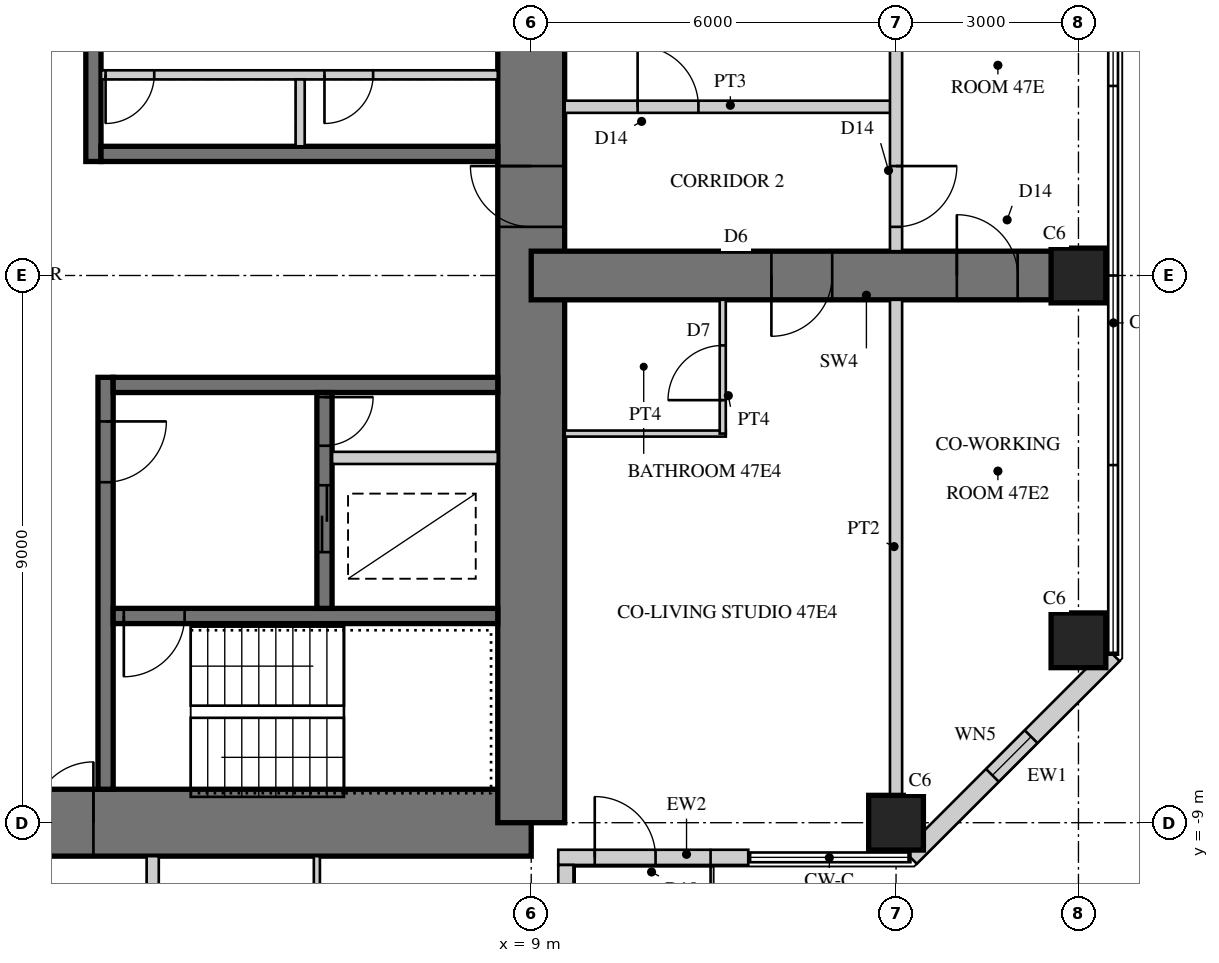
"""IFC4 building model, lengths in metres.
Left out: names, types, materials, properties, quantities, classifications, styles, units other than length and angle.
Written with IfcOpenShell. Run it as: python <this file> out.ifc"""

import sys

from ifc_helpers import new_model, si_unit, direction, frame, frame_2d, origin, origin_2d, place, context, subcontext, project, spatial, rectangle, hollow_rectangle, extrude, element, fill, save


model = new_model("IFC4")
c1 = context("Model", 3, precision=1e-05, world=origin(), true_north=direction((0.0, 1.0)))
c2 = subcontext(c1, "Body", "Model", "MODEL_VIEW")
j1 = project(units=[si_unit("LENGTHUNIT", "METRE"), si_unit("PLANEANGLEUNIT", "RADIAN")], contexts=[c1])
p1 = place(None, origin())
s1 = spatial("IfcSite", under=j1, at=p1, CompositionType="ELEMENT")
p2 = place(p1, origin())
s2 = spatial("IfcBuilding", under=s1, at=p2, CompositionType="ELEMENT")
p3 = place(p2, frame((0.0, 0.0, 189.9)))
s3 = spatial("IfcBuildingStorey", under=s2, at=p3, CompositionType="ELEMENT", Elevation=189.9)
p4 = place(p3, frame((-9.0, -9.0, 0.0), z_axis=(0.0, 0.0, 1.0), x_axis=(1.0, 0.0, 0.0)))
e1 = element("IfcWall", 1, at=p4, inside=s3, PredefinedType="SHEAR", context=c2, shape_type="SweptSolid", body=[
    extrude(rectangle(XDim=18.0, YDim=1.1, at=frame_2d((9.0, 0.0))), origin(), (0.0, 0.0, 1.0), 3.4),
])
p5 = place(p4, frame((9.8, 0.0, 0.0)))
e2 = element("IfcOpeningElement", 2, at=p5, cuts=e1, PredefinedType="OPENING", context=c2, shape_type="SweptSolid", body=[
    extrude(rectangle(XDim=1.0, YDim=2.4, at=frame_2d((0.5, 1.2))), frame((0.0, 0.56, 0.0), z_axis=(0.0, -1.0, 0.0), x_axis=(1.0, 0.0, 0.0)), (0.0, 0.0, 1.0), 1.12),
])
p6 = place(p3, frame((9.0, -9.0, 0.0), z_axis=(0.0, 0.0, 1.0), x_axis=(0.0, 1.0, 0.0)))
e3 = element("IfcWall", 3, at=p6, inside=s3, PredefinedType="SHEAR", context=c2, shape_type="SweptSolid", body=[
    extrude(rectangle(XDim=18.0, YDim=1.1, at=frame_2d((9.0, 0.0))), origin(), (0.0, 0.0, 1.0), 3.4),
])
p7 = place(p6, frame((9.8, 0.0, 0.0)))
e4 = element("IfcOpeningElement", 4, at=p7, cuts=e3, PredefinedType="OPENING", context=c2, shape_type="SweptSolid", body=[
    extrude(rectangle(XDim=1.0, YDim=2.4, at=frame_2d((0.5, 1.2))), frame((0.0, 0.56, 0.0), z_axis=(0.0, -1.0, 0.0), x_axis=(1.0, 0.0, 0.0)), (0.0, 0.0, 1.0), 1.12),
])
p8 = place(p3, frame((1.8, 1.875, 0.0), z_axis=(0.0, 0.0, 1.0), x_axis=(0.0, 1.0, 0.0)))
e5 = element("IfcWall", 5, at=p8, inside=s3, PredefinedType="SHEAR", context=c2, shape_type="SweptSolid", body=[
    extrude(rectangle(XDim=6.575, YDim=0.25, at=frame_2d((3.288, 0.0))), origin(), (0.0, 0.0, 1.0), 3.4),
])
p9 = place(p8, frame((1.875, 0.0, 0.0)))
e6 = element("IfcOpeningElement", 6, at=p9, cuts=e5, PredefinedType="OPENING", context=c2, shape_type="SweptSolid", body=[
    extrude(rectangle(XDim=1.6, YDim=2.4, at=frame_2d((0.8, 1.2))), frame((0.0, 0.135, 0.0), z_axis=(0.0, -1.0, 0.0), x_axis=(1.0, 0.0, 0.0)), (0.0, 0.0, 1.0), 0.27),
])
p10 = place(p3, frame((1.925, 2.0, 0.0), z_axis=(0.0, 0.0, 1.0), x_axis=(1.0, 0.0, 0.0)))
e7 = element("IfcWall", 7, at=p10, inside=s3, PredefinedType="SHEAR", context=c2, shape_type="SweptSolid", body=[
    extrude(rectangle(XDim=6.525, YDim=0.25, at=frame_2d((3.262, 0.0))), origin(), (0.0, 0.0, 1.0), 3.4),
])
p11 = place(p3, frame((1.925, 3.3, 0.0), z_axis=(0.0, 0.0, 1.0), x_axis=(1.0, 0.0, 0.0)))
e8 = element("IfcWall", 8, at=p11, inside=s3, PredefinedType="PARTITIONING", context=c2, shape_type="SweptSolid", body=[
    extrude(rectangle(XDim=6.525, YDim=0.15, at=frame_2d((3.262, 0.0))), origin(), (0.0, 0.0, 1.0), 3.4),
])
p12 = place(p11, frame((0.075, 0.0, 0.0)))
e9 = element("IfcOpeningElement", 9, at=p12, cuts=e8, PredefinedType="OPENING", context=c2, shape_type="SweptSolid", body=[
    extrude(rectangle(XDim=0.8, YDim=2.1, at=frame_2d((0.4, 1.05))), frame((0.0, 0.085, 0.0), z_axis=(0.0, -1.0, 0.0), x_axis=(1.0, 0.0, 0.0)), (0.0, 0.0, 1.0), 0.17),
])
p13 = place(p11, frame((3.675, 0.0, 0.0)))
e10 = element("IfcOpeningElement", 10, at=p13, cuts=e8, PredefinedType="OPENING", context=c2, shape_type="SweptSolid", body=[
    extrude(rectangle(XDim=0.8, YDim=2.1, at=frame_2d((0.4, 1.05))), frame((0.0, 0.085, 0.0), z_axis=(0.0, -1.0, 0.0), x_axis=(1.0, 0.0, 0.0)), (0.0, 0.0, 1.0), 0.17),
])
p14 = place(p3, frame((5.2, 2.125, 0.0), z_axis=(0.0, 0.0, 1.0), x_axis=(0.0, 1.0, 0.0)))
e11 = element("IfcWall", 11, at=p14, inside=s3, PredefinedType="PARTITIONING", context=c2, shape_type="SweptSolid", body=[
    extrude(rectangle(XDim=1.1, YDim=0.15, at=frame_2d((0.55, 0.0))), origin(), (0.0, 0.0, 1.0), 3.4),
])
p15 = place(p3, frame((2.0, -1.675, 0.0), z_axis=(0.0, 0.0, 1.0), x_axis=(0.0, -1.0, 0.0)))
e12 = element("IfcWall", 12, at=p15, inside=s3, PredefinedType="SHEAR", context=c2, shape_type="SweptSolid", body=[
    extrude(rectangle(XDim=6.775, YDim=0.25, at=frame_2d((3.387, 0.0))), origin(), (0.0, 0.0, 1.0), 3.4),
])
p16 = place(p15, frame((0.725, 0.0, 0.0)))
e13 = element("IfcOpeningElement", 13, at=p16, cuts=e12, PredefinedType="OPENING", context=c2, shape_type="SweptSolid", body=[
    extrude(rectangle(XDim=1.0, YDim=2.1, at=frame_2d((0.5, 1.05))), frame((0.0, 0.135, 0.0), z_axis=(0.0, -1.0, 0.0), x_axis=(1.0, 0.0, 0.0)), (0.0, 0.0, 1.0), 0.27),
])
p17 = place(p3, frame((2.125, -1.8, 0.0), z_axis=(0.0, 0.0, 1.0), x_axis=(1.0, 0.0, 0.0)))
e14 = element("IfcWall", 14, at=p17, inside=s3, PredefinedType="SHEAR", context=c2, shape_type="SweptSolid", body=[
    extrude(rectangle(XDim=6.325, YDim=0.25, at=frame_2d((3.163, 0.0))), origin(), (0.0, 0.0, 1.0), 3.4),
])
p18 = place(p3, frame((2.125, -5.6, 0.0), z_axis=(0.0, 0.0, 1.0), x_axis=(1.0, 0.0, 0.0)))
e15 = element("IfcWall", 15, at=p18, inside=s3, PredefinedType="SHEAR", context=c2, shape_type="SweptSolid", body=[
    extrude(rectangle(XDim=6.325, YDim=0.25, at=frame_2d((3.163, 0.0))), origin(), (0.0, 0.0, 1.0), 3.4),
])
p19 = place(p18, frame((0.175, 0.0, 0.0)))
e16 = element("IfcOpeningElement", 16, at=p19, cuts=e15, PredefinedType="OPENING", context=c2, shape_type="SweptSolid", body=[
    extrude(rectangle(XDim=1.0, YDim=2.1, at=frame_2d((0.5, 1.05))), frame((0.0, 0.135, 0.0), z_axis=(0.0, -1.0, 0.0), x_axis=(1.0, 0.0, 0.0)), (0.0, 0.0, 1.0), 0.27),
])
p20 = place(p3, frame((5.6, -1.925, 0.0), z_axis=(0.0, 0.0, 1.0), x_axis=(0.0, -1.0, 0.0)))
e17 = element("IfcWall", 17, at=p20, inside=s3, PredefinedType="SHEAR", context=c2, shape_type="SweptSolid", body=[
    extrude(rectangle(XDim=3.55, YDim=0.25, at=frame_2d((1.775, 0.0))), origin(), (0.0, 0.0, 1.0), 3.4),
])
p21 = place(p20, frame((1.525, 0.0, 0.0)))
e18 = element("IfcOpeningElement", 18, at=p21, cuts=e17, PredefinedType="OPENING", context=c2, shape_type="SweptSolid", body=[
    extrude(rectangle(XDim=1.1, YDim=2.2, at=frame_2d((0.55, 1.1))), frame((0.0, 0.135, 0.0), z_axis=(0.0, -1.0, 0.0), x_axis=(1.0, 0.0, 0.0)), (0.0, 0.0, 1.0), 0.27),
])
p22 = place(p20, frame((0.075, 0.0, 0.0)))
e19 = element("IfcOpeningElement", 19, at=p22, cuts=e17, PredefinedType="OPENING", context=c2, shape_type="SweptSolid", body=[
    extrude(rectangle(XDim=0.8, YDim=2.1, at=frame_2d((0.4, 1.05))), frame((0.0, 0.135, 0.0), z_axis=(0.0, -1.0, 0.0), x_axis=(1.0, 0.0, 0.0)), (0.0, 0.0, 1.0), 0.27),
])
p23 = place(p3, frame((5.725, -3.0, 0.0), z_axis=(0.0, 0.0, 1.0), x_axis=(1.0, 0.0, 0.0)))
e20 = element("IfcWall", 20, at=p23, inside=s3, PredefinedType="PARTITIONING", context=c2, shape_type="SweptSolid", body=[
    extrude(rectangle(XDim=2.725, YDim=0.2, at=frame_2d((1.362, 0.0))), origin(), (0.0, 0.0, 1.0), 3.4),
])
p24 = place(p3, frame((9.0, 0.0, 0.0), z_axis=(0.0, 0.0, 1.0), x_axis=(1.0, 0.0, 0.0)))
e21 = element("IfcWall", 21, at=p24, inside=s3, PredefinedType="SHEAR", context=c2, shape_type="SweptSolid", body=[
    extrude(rectangle(XDim=9.0, YDim=0.8, at=frame_2d((4.5, 0.0))), origin(), (0.0, 0.0, 1.0), 3.4),
])
p25 = place(p24, frame((3.95, 0.0, 0.0)))
e22 = element("IfcOpeningElement", 22, at=p25, cuts=e21, PredefinedType="OPENING", context=c2, shape_type="SweptSolid", body=[
    extrude(rectangle(XDim=1.0, YDim=2.15, at=frame_2d((0.5, 1.075))), frame((0.0, 0.41, 0.0), z_axis=(0.0, -1.0, 0.0), x_axis=(1.0, 0.0, 0.0)), (0.0, 0.0, 1.0), 0.82),
])
p26 = place(p24, frame((7.0, 0.0, 0.0)))
e23 = element("IfcOpeningElement", 23, at=p26, cuts=e21, PredefinedType="OPENING", context=c2, shape_type="SweptSolid", body=[
    extrude(rectangle(XDim=1.0, YDim=2.2, at=frame_2d((0.5, 1.1))), frame((0.0, 0.41, 0.0), z_axis=(0.0, -1.0, 0.0), x_axis=(1.0, 0.0, 0.0)), (0.0, 0.0, 1.0), 0.82),
])
for number, where, z_axis, x_axis in (
    (24, (15.0, -9.0, 0.0), (0.0, 0.0, 1.0), (1.0, 0.0, 0.0)),
    (25, (18.0, -6.0, 0.0), (0.0, 0.0, 1.0), (1.0, 0.0, 0.0)),
    (26, (18.0, 0.0, 0.0), (0.0, 0.0, 1.0), (1.0, 0.0, 0.0)),
):
    element("IfcColumn", number, at=place(p3, frame(where, z_axis=z_axis, x_axis=x_axis)), inside=s3, PredefinedType="COLUMN", context=c2, shape_type="SweptSolid", body=[
        extrude(rectangle(XDim=0.9, YDim=0.9, at=origin_2d()), origin(), (0.0, 0.0, 1.0), 3.4),
    ])
p27 = place(p3, frame((9.445, -9.57, 0.0), z_axis=(0.0, 0.0, 1.0), x_axis=(1.0, 0.0, 0.0)))
e27 = element("IfcWall", 27, at=p27, inside=s3, PredefinedType="SOLIDWALL", context=c2, shape_type="SweptSolid", body=[
    extrude(rectangle(XDim=3.125, YDim=0.25, at=frame_2d((1.562, 0.0))), origin(), (0.0, 0.0, 1.0), 3.22),
])
p28 = place(p27, frame((0.6, 0.0, 0.0)))
e28 = element("IfcOpeningElement", 28, at=p28, cuts=e27, PredefinedType="OPENING", context=c2, shape_type="SweptSolid", body=[
    extrude(rectangle(XDim=1.0, YDim=2.2, at=frame_2d((0.5, 1.1))), frame((0.0, 0.135, 0.0), z_axis=(0.0, -1.0, 0.0), x_axis=(1.0, 0.0, 0.0)), (0.0, 0.0, 1.0), 0.27),
])
p29 = place(p3, frame((15.236, -9.57, 0.0), z_axis=(0.0, 0.0, 1.0), x_axis=(0.707106781187, 0.707106781187, 0.0)))
e29 = element("IfcWall", 29, at=p29, inside=s3, PredefinedType="SOLIDWALL", context=c2, shape_type="SweptSolid", body=[
    extrude(rectangle(XDim=4.715, YDim=0.3, at=frame_2d((2.357, 0.0))), origin(), (0.0, 0.0, 1.0), 3.22),
])
p30 = place(p29, frame((1.907, 0.0, 0.3)))
e30 = element("IfcOpeningElement", 30, at=p30, cuts=e29, PredefinedType="OPENING", context=c2, shape_type="SweptSolid", body=[
    extrude(rectangle(XDim=0.9, YDim=2.4, at=frame_2d((0.45, 1.2))), frame((0.0, 0.16, 0.0), z_axis=(0.0, -1.0, 0.0), x_axis=(1.0, 0.0, 0.0)), (0.0, 0.0, 1.0), 0.32),
])
p31 = place(p3, frame((9.57, -12.57, 0.0), z_axis=(0.0, 0.0, 1.0), x_axis=(0.0, 1.0, 0.0)))
e31 = element("IfcWall", 31, at=p31, inside=s3, PredefinedType="SOLIDWALL", context=c2, shape_type="SweptSolid", body=[
    extrude(rectangle(XDim=2.875, YDim=0.25, at=frame_2d((1.438, 0.0))), origin(), (0.0, 0.0, 1.0), 3.22),
])
p32 = place(p31, frame((0.6, 0.0, 0.0)))
e32 = element("IfcOpeningElement", 32, at=p32, cuts=e31, PredefinedType="OPENING", context=c2, shape_type="SweptSolid", body=[
    extrude(rectangle(XDim=1.0, YDim=2.2, at=frame_2d((0.5, 1.1))), frame((0.0, 0.135, 0.0), z_axis=(0.0, -1.0, 0.0), x_axis=(1.0, 0.0, 0.0)), (0.0, 0.0, 1.0), 0.27),
])
p33 = place(p3, frame((9.55, -2.6, 0.0), z_axis=(0.0, 0.0, 1.0), x_axis=(1.0, 0.0, 0.0)))
e33 = element("IfcWall", 33, at=p33, inside=s3, PredefinedType="PARTITIONING", context=c2, shape_type="SweptSolid", body=[
    extrude(rectangle(XDim=2.65, YDim=0.1, at=frame_2d((1.325, 0.0))), origin(), (0.0, 0.0, 1.0), 3.22),
])
p34 = place(p3, frame((12.15, -2.6, 0.0), z_axis=(0.0, 0.0, 1.0), x_axis=(0.0, 1.0, 0.0)))
e34 = element("IfcWall", 34, at=p34, inside=s3, PredefinedType="PARTITIONING", context=c2, shape_type="SweptSolid", body=[
    extrude(rectangle(XDim=2.2, YDim=0.1, at=frame_2d((1.1, 0.0))), origin(), (0.0, 0.0, 1.0), 3.22),
])
p35 = place(p34, frame((0.55, 0.0, 0.0)))
e35 = element("IfcOpeningElement", 35, at=p35, cuts=e34, PredefinedType="OPENING", context=c2, shape_type="SweptSolid", body=[
    extrude(rectangle(XDim=0.9, YDim=2.1, at=frame_2d((0.45, 1.05))), frame((0.0, 0.06, 0.0), z_axis=(0.0, -1.0, 0.0), x_axis=(1.0, 0.0, 0.0)), (0.0, 0.0, 1.0), 0.12),
])
p36 = place(p3, frame((9.55, 2.775, 0.0), z_axis=(0.0, 0.0, 1.0), x_axis=(1.0, 0.0, 0.0)))
e36 = element("IfcWall", 36, at=p36, inside=s3, PredefinedType="SOLIDWALL", context=c2, shape_type="SweptSolid", body=[
    extrude(rectangle(XDim=5.45, YDim=0.2, at=frame_2d((2.725, 0.0))), origin(), (0.0, 0.0, 1.0), 3.22),
])
p37 = place(p36, frame((1.2, 0.0, 0.0)))
e37 = element("IfcOpeningElement", 37, at=p37, cuts=e36, PredefinedType="OPENING", context=c2, shape_type="SweptSolid", body=[
    extrude(rectangle(XDim=1.0, YDim=2.2, at=frame_2d((0.5, 1.1))), frame((0.0, 0.11, 0.0), z_axis=(0.0, -1.0, 0.0), x_axis=(1.0, 0.0, 0.0)), (0.0, 0.0, 1.0), 0.22),
])
p38 = place(p3, frame((15.0, -8.55, 0.0), z_axis=(0.0, 0.0, 1.0), x_axis=(0.0, 1.0, 0.0)))
e38 = element("IfcWall", 38, at=p38, inside=s3, PredefinedType="SOLIDWALL", context=c2, shape_type="SweptSolid", body=[
    extrude(rectangle(XDim=8.15, YDim=0.2, at=frame_2d((4.075, 0.0))), origin(), (0.0, 0.0, 1.0), 2.47),
])
p39 = place(p3, frame((15.0, 0.4, 0.0), z_axis=(0.0, 0.0, 1.0), x_axis=(0.0, 1.0, 0.0)))
e39 = element("IfcWall", 39, at=p39, inside=s3, PredefinedType="SOLIDWALL", context=c2, shape_type="SweptSolid", body=[
    extrude(rectangle(XDim=8.15, YDim=0.2, at=frame_2d((4.075, 0.0))), origin(), (0.0, 0.0, 1.0), 2.47),
])
p40 = place(p39, frame((0.4, 0.0, 0.0)))
e40 = element("IfcOpeningElement", 40, at=p40, cuts=e39, PredefinedType="OPENING", context=c2, shape_type="SweptSolid", body=[
    extrude(rectangle(XDim=1.0, YDim=2.2, at=frame_2d((0.5, 1.1))), frame((0.0, 0.11, 0.0), z_axis=(0.0, -1.0, 0.0), x_axis=(1.0, 0.0, 0.0)), (0.0, 0.0, 1.0), 0.22),
])
p41 = place(p3, frame((5.475, -9.55, 0.0), z_axis=(0.0, 0.0, 1.0), x_axis=(0.0, -1.0, 0.0)))
e41 = element("IfcWall", 41, at=p41, inside=s3, PredefinedType="PARTITIONING", context=c2, shape_type="SweptSolid", body=[
    extrude(rectangle(XDim=2.85, YDim=0.1, at=frame_2d((1.425, 0.0))), origin(), (0.0, 0.0, 1.0), 3.22),
])
p42 = place(p3, frame((2.775, -9.55, 0.0), z_axis=(0.0, 0.0, 1.0), x_axis=(0.0, -1.0, 0.0)))
e42 = element("IfcWall", 42, at=p42, inside=s3, PredefinedType="SOLIDWALL", context=c2, shape_type="SweptSolid", body=[
    extrude(rectangle(XDim=11.45, YDim=0.2, at=frame_2d((5.725, 0.0))), origin(), (0.0, 0.0, 1.0), 3.22),
])
p43 = place(p42, frame((3.4, 0.0, 0.0)))
e43 = element("IfcOpeningElement", 43, at=p43, cuts=e42, PredefinedType="OPENING", context=c2, shape_type="SweptSolid", body=[
    extrude(rectangle(XDim=1.0, YDim=2.15, at=frame_2d((0.5, 1.075))), frame((0.0, 0.11, 0.0), z_axis=(0.0, -1.0, 0.0), x_axis=(1.0, 0.0, 0.0)), (0.0, 0.0, 1.0), 0.22),
])
p44 = place(p42, frame((6.65, 0.0, 0.0)))
e44 = element("IfcOpeningElement", 44, at=p44, cuts=e42, PredefinedType="OPENING", context=c2, shape_type="SweptSolid", body=[
    extrude(rectangle(XDim=1.0, YDim=2.2, at=frame_2d((0.5, 1.1))), frame((0.0, 0.11, 0.0), z_axis=(0.0, -1.0, 0.0), x_axis=(1.0, 0.0, 0.0)), (0.0, 0.0, 1.0), 0.22),
])
p45 = place(p28, origin())
e45 = element("IfcDoor", 45, at=p45, inside=s3, OperationType="SINGLE_SWING_LEFT", PredefinedType="DOOR", context=c2, shape_type="SweptSolid", body=[
    extrude(hollow_rectangle(XDim=1.0, YDim=2.2, WallThickness=0.06, at=frame_2d((0.5, 1.1))), frame((0.0, 0.025, 0.0), z_axis=(0.0, -1.0, 0.0), x_axis=(1.0, 0.0, 0.0)), (0.0, 0.0, 1.0), 0.05),
    extrude(rectangle(XDim=0.879, YDim=2.079, at=frame_2d((0.5, 1.1))), frame((0.0, 0.025, 0.0), z_axis=(0.0, -1.0, 0.0), x_axis=(1.0, 0.0, 0.0)), (0.0, 0.0, 1.0), 0.05),
])
fill(e28, e45)
p46 = place(p30, origin())
e46 = element("IfcWindow", 46, at=p46, inside=s3, PartitioningType="SINGLE_PANEL", PredefinedType="WINDOW", context=c2, shape_type="SweptSolid", body=[
    extrude(hollow_rectangle(XDim=0.9, YDim=2.4, WallThickness=0.06, at=frame_2d((0.45, 1.2))), frame((0.0, 0.03, 0.0), z_axis=(0.0, -1.0, 0.0), x_axis=(1.0, 0.0, 0.0)), (0.0, 0.0, 1.0), 0.06),
    extrude(rectangle(XDim=0.779, YDim=2.279, at=frame_2d((0.45, 1.2))), frame((0.0, 0.03, 0.0), z_axis=(0.0, -1.0, 0.0), x_axis=(1.0, 0.0, 0.0)), (0.0, 0.0, 1.0), 0.06),
])
fill(e30, e46)
p47 = place(p35, origin())
e47 = element("IfcDoor", 47, at=p47, inside=s3, OperationType="SINGLE_SWING_LEFT", PredefinedType="DOOR", context=c2, shape_type="SweptSolid", body=[
    extrude(rectangle(XDim=0.9, YDim=2.1, at=frame_2d((0.45, 1.05))), frame((0.0, 0.025, 0.0), z_axis=(0.0, -1.0, 0.0), x_axis=(1.0, 0.0, 0.0)), (0.0, 0.0, 1.0), 0.05),
])
fill(e35, e47)
p48 = place(p37, origin())
e48 = element("IfcDoor", 48, at=p48, inside=s3, OperationType="SINGLE_SWING_LEFT", PredefinedType="DOOR", context=c2, shape_type="SweptSolid", body=[
    extrude(rectangle(XDim=1.0, YDim=2.2, at=frame_2d((0.5, 1.1))), frame((0.0, 0.025, 0.0), z_axis=(0.0, -1.0, 0.0), x_axis=(1.0, 0.0, 0.0)), (0.0, 0.0, 1.0), 0.05),
])
fill(e37, e48)
p49 = place(p40, frame((1.0, 0.0, 0.0), z_axis=(0.0, 0.0, 1.0), x_axis=(-1.0, 0.0, 0.0)))
e49 = element("IfcDoor", 49, at=p49, inside=s3, OperationType="SINGLE_SWING_LEFT", PredefinedType="DOOR", context=c2, shape_type="SweptSolid", body=[
    extrude(rectangle(XDim=1.0, YDim=2.2, at=frame_2d((0.5, 1.1))), frame((0.0, 0.025, 0.0), z_axis=(0.0, -1.0, 0.0), x_axis=(1.0, 0.0, 0.0)), (0.0, 0.0, 1.0), 0.05),
])
fill(e40, e49)
p50 = place(p25, frame((1.0, 0.0, 0.0), z_axis=(0.0, 0.0, 1.0), x_axis=(-1.0, 0.0, 0.0)))
e50 = element("IfcDoor", 50, at=p50, inside=s3, OperationType="SINGLE_SWING_RIGHT", PredefinedType="DOOR", context=c2, shape_type="SweptSolid", body=[
    extrude(rectangle(XDim=1.0, YDim=2.15, at=frame_2d((0.5, 1.075))), frame((0.0, 0.025, 0.0), z_axis=(0.0, -1.0, 0.0), x_axis=(1.0, 0.0, 0.0)), (0.0, 0.0, 1.0), 0.05),
])
fill(e22, e50)
p51 = place(p26, origin())
e51 = element("IfcDoor", 51, at=p51, inside=s3, OperationType="SINGLE_SWING_LEFT", PredefinedType="DOOR", context=c2, shape_type="SweptSolid", body=[
    extrude(rectangle(XDim=1.0, YDim=2.2, at=frame_2d((0.5, 1.1))), frame((0.0, 0.025, 0.0), z_axis=(0.0, -1.0, 0.0), x_axis=(1.0, 0.0, 0.0)), (0.0, 0.0, 1.0), 0.05),
])
fill(e23, e51)
p52 = place(p5, origin())
e52 = element("IfcDoor", 52, at=p52, inside=s3, OperationType="SINGLE_SWING_RIGHT", PredefinedType="DOOR", context=c2, shape_type="SweptSolid", body=[
    extrude(rectangle(XDim=1.0, YDim=2.4, at=frame_2d((0.5, 1.2))), frame((0.0, 0.055, 0.0), z_axis=(0.0, -1.0, 0.0), x_axis=(1.0, 0.0, 0.0)), (0.0, 0.0, 1.0), 0.05),
])
fill(e2, e52)
p53 = place(p7, origin())
e53 = element("IfcDoor", 53, at=p53, inside=s3, OperationType="SINGLE_SWING_RIGHT", PredefinedType="DOOR", context=c2, shape_type="SweptSolid", body=[
    extrude(rectangle(XDim=1.0, YDim=2.4, at=frame_2d((0.5, 1.2))), frame((0.0, 0.055, 0.0), z_axis=(0.0, -1.0, 0.0), x_axis=(1.0, 0.0, 0.0)), (0.0, 0.0, 1.0), 0.05),
])
fill(e4, e53)
p54 = place(p12, frame((0.8, 0.0, 0.0), z_axis=(0.0, 0.0, 1.0), x_axis=(-1.0, 0.0, 0.0)))
e54 = element("IfcDoor", 54, at=p54, inside=s3, OperationType="SINGLE_SWING_RIGHT", PredefinedType="DOOR", context=c2, shape_type="SweptSolid", body=[
    extrude(rectangle(XDim=0.8, YDim=2.1, at=frame_2d((0.4, 1.05))), frame((0.0, 0.025, 0.0), z_axis=(0.0, -1.0, 0.0), x_axis=(1.0, 0.0, 0.0)), (0.0, 0.0, 1.0), 0.05),
])
fill(e9, e54)
p55 = place(p13, frame((0.8, 0.0, 0.0), z_axis=(0.0, 0.0, 1.0), x_axis=(-1.0, 0.0, 0.0)))
e55 = element("IfcDoor", 55, at=p55, inside=s3, OperationType="SINGLE_SWING_RIGHT", PredefinedType="DOOR", context=c2, shape_type="SweptSolid", body=[
    extrude(rectangle(XDim=0.8, YDim=2.1, at=frame_2d((0.4, 1.05))), frame((0.0, 0.025, 0.0), z_axis=(0.0, -1.0, 0.0), x_axis=(1.0, 0.0, 0.0)), (0.0, 0.0, 1.0), 0.05),
])
fill(e10, e55)
p56 = place(p16, origin())
e56 = element("IfcDoor", 56, at=p56, inside=s3, OperationType="SINGLE_SWING_LEFT", PredefinedType="DOOR", context=c2, shape_type="SweptSolid", body=[
    extrude(rectangle(XDim=1.0, YDim=2.1, at=frame_2d((0.5, 1.05))), frame((0.0, 0.025, 0.0), z_axis=(0.0, -1.0, 0.0), x_axis=(1.0, 0.0, 0.0)), (0.0, 0.0, 1.0), 0.05),
])
fill(e13, e56)
p57 = place(p19, frame((1.0, 0.0, 0.0), z_axis=(0.0, 0.0, 1.0), x_axis=(-1.0, 0.0, 0.0)))
e57 = element("IfcDoor", 57, at=p57, inside=s3, OperationType="SINGLE_SWING_RIGHT", PredefinedType="DOOR", context=c2, shape_type="SweptSolid", body=[
    extrude(rectangle(XDim=1.0, YDim=2.1, at=frame_2d((0.5, 1.05))), frame((0.0, 0.025, 0.0), z_axis=(0.0, -1.0, 0.0), x_axis=(1.0, 0.0, 0.0)), (0.0, 0.0, 1.0), 0.05),
])
fill(e16, e57)
p58 = place(p21, origin())
e58 = element("IfcDoor", 58, at=p58, inside=s3, OperationType="DOUBLE_DOOR_SLIDING", PredefinedType="DOOR", context=c2, shape_type="SweptSolid", body=[
    extrude(rectangle(XDim=1.1, YDim=2.2, at=frame_2d((0.55, 1.1))), frame((0.0, 0.025, 0.0), z_axis=(0.0, -1.0, 0.0), x_axis=(1.0, 0.0, 0.0)), (0.0, 0.0, 1.0), 0.05),
])
fill(e18, e58)
p59 = place(p22, origin())
e59 = element("IfcDoor", 59, at=p59, inside=s3, OperationType="SINGLE_SWING_LEFT", PredefinedType="DOOR", context=c2, shape_type="SweptSolid", body=[
    extrude(rectangle(XDim=0.8, YDim=2.1, at=frame_2d((0.4, 1.05))), frame((0.0, 0.025, 0.0), z_axis=(0.0, -1.0, 0.0), x_axis=(1.0, 0.0, 0.0)), (0.0, 0.0, 1.0), 0.05),
])
fill(e19, e59)
save(model, sys.argv[1])
